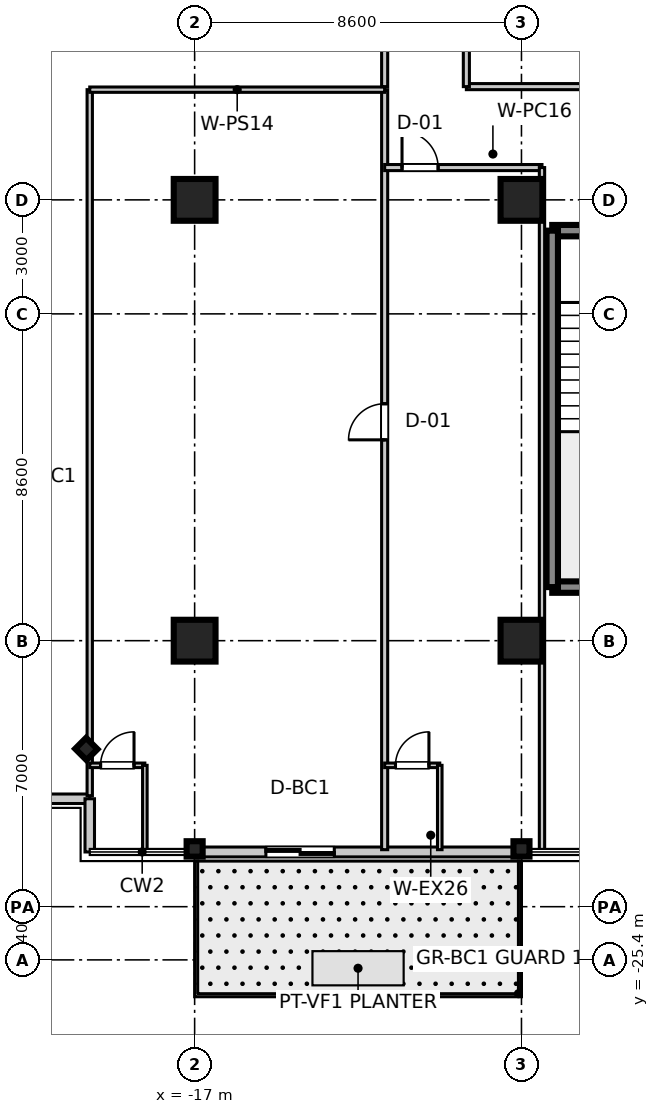
"""IFC4 building model, lengths in metres.
Left out: names, types, materials, properties, quantities, classifications, styles, units other than length and angle.
Written with IfcOpenShell. Run it as: python <this file> out.ifc"""

import sys

from ifc_helpers import new_model, si_unit, direction, frame, frame_2d, origin, origin_2d, place, context, subcontext, project, spatial, rectangle, i_section, extrude, source, transform, mapped, element, fill, save


model = new_model("IFC4")
c1 = context("Model", 3, precision=1e-05, world=origin(), true_north=direction((0.0, 1.0)))
c2 = subcontext(c1, "Body", "Model", "MODEL_VIEW")
j1 = project(units=[si_unit("LENGTHUNIT", "METRE"), si_unit("PLANEANGLEUNIT", "RADIAN")], contexts=[c1])
p1 = place(None, origin())
s1 = spatial("IfcSite", under=j1, at=p1, CompositionType="ELEMENT")
p2 = place(p1, origin())
s2 = spatial("IfcBuilding", under=s1, at=p2, CompositionType="ELEMENT")
p3 = place(p2, frame((0.0, 0.0, 156.3)))
s3 = spatial("IfcBuildingStorey", under=s2, at=p3, CompositionType="ELEMENT", Elevation=156.3)
m1 = source(origin(), c2, "Body", "SweptSolid", [
    extrude(rectangle(XDim=1.1, YDim=1.1, at=origin_2d()), origin(), (0.0, 0.0, 1.0), 3.605),
])
for number, where, z_axis, x_axis in (
    (1, (-17.0, -17.0, 0.0), (0.0, 0.0, 1.0), (1.0, 0.0, 0.0)),
    (2, (-17.0, -5.4, 0.0), (0.0, 0.0, 1.0), (1.0, 0.0, 0.0)),
    (3, (-8.4, -17.0, 0.0), (0.0, 0.0, 1.0), (1.0, 0.0, 0.0)),
    (4, (-8.4, -5.4, 0.0), (0.0, 0.0, 1.0), (1.0, 0.0, 0.0)),
):
    element("IfcColumn", number, at=place(p3, frame(where, z_axis=z_axis, x_axis=x_axis)), inside=s3, PredefinedType="COLUMN", context=c2, shape_type="MappedRepresentation", body=[
        mapped(m1, transform((0.0, 0.0, 0.0), scale=1.0)),
    ])
m2 = source(origin(), c2, "Body", "SweptSolid", [
    extrude(i_section(OverallWidth=0.406, OverallDepth=0.422, WebThickness=0.019, FlangeThickness=0.03, at=origin_2d()), origin(), (0.0, 0.0, 1.0), 3.605),
])
for number, where, z_axis, x_axis in (
    (5, (-17.0, -22.48, 0.0), (0.0, 0.0, 1.0), (0.0, 1.0, 0.0)),
    (6, (-8.4, -22.48, 0.0), (0.0, 0.0, 1.0), (0.0, 1.0, 0.0)),
    (7, (-19.85, -19.85, 0.0), (0.0, 0.0, 1.0), (0.707, 0.707, 0.0)),
):
    element("IfcColumn", number, at=place(p3, frame(where, z_axis=z_axis, x_axis=x_axis)), inside=s3, PredefinedType="COLUMN", context=c2, shape_type="MappedRepresentation", body=[
        mapped(m2, transform((0.0, 0.0, 0.0), scale=1.0)),
    ])
m3 = source(origin(), c2, "Body", "SweptSolid", [
    extrude(rectangle(XDim=3.98, YDim=0.3, at=frame_2d((1.99, 0.0))), origin(), (0.0, 0.0, 1.0), 3.39),
])
p4 = place(p3, frame((-7.59, -15.59, 0.0), z_axis=(0.0, 0.0, 1.0), x_axis=(1.0, 0.0, 0.0)))
e8 = element("IfcWall", 8, at=p4, inside=s3, PredefinedType="SHEAR", context=c2, shape_type="MappedRepresentation", body=[
    mapped(m3, transform((0.0, 0.0, 0.0), scale=1.0)),
])
p5 = place(p3, frame((-7.59, -6.21, 0.0), z_axis=(0.0, 0.0, 1.0), x_axis=(1.0, 0.0, 0.0)))
e9 = element("IfcWall", 9, at=p5, inside=s3, PredefinedType="SHEAR", context=c2, shape_type="MappedRepresentation", body=[
    mapped(m3, transform((0.0, 0.0, 0.0), scale=1.0)),
])
p6 = place(p5, frame((1.44, 0.0, 0.0)))
e10 = element("IfcOpeningElement", 10, at=p6, cuts=e9, PredefinedType="OPENING", context=c2, shape_type="SweptSolid", body=[
    extrude(rectangle(XDim=1.1, YDim=2.15, at=frame_2d((0.55, 1.075))), frame((0.0, 0.16, 0.0), z_axis=(0.0, -1.0, 0.0), x_axis=(1.0, 0.0, 0.0)), (0.0, 0.0, 1.0), 0.32),
])
m4 = source(origin(), c2, "Body", "SweptSolid", [
    extrude(rectangle(XDim=9.38, YDim=0.3, at=frame_2d((4.69, 0.0))), origin(), (0.0, 0.0, 1.0), 3.39),
])
p7 = place(p3, frame((-7.59, -15.59, 0.0), z_axis=(0.0, 0.0, 1.0), x_axis=(0.0, 1.0, 0.0)))
e11 = element("IfcWall", 11, at=p7, inside=s3, PredefinedType="SHEAR", context=c2, shape_type="MappedRepresentation", body=[
    mapped(m4, transform((0.0, 0.0, 0.0), scale=1.0)),
])
m5 = source(origin(), c2, "Body", "SweptSolid", [
    extrude(rectangle(XDim=1.4, YDim=0.25, at=frame_2d((0.7, 0.0))), origin(), (0.0, 0.0, 1.0), 3.39),
])
p8 = place(p3, frame((-21.16, -21.16, 0.0), z_axis=(0.0, 0.0, 1.0), x_axis=(1.0, 0.0, 0.0)))
e12 = element("IfcWall", 12, at=p8, inside=s3, PredefinedType="STANDARD", context=c2, shape_type="MappedRepresentation", body=[
    mapped(m5, transform((0.0, 0.0, 0.0), scale=1.0)),
])
m6 = source(origin(), c2, "Body", "SweptSolid", [
    extrude(rectangle(XDim=1.4, YDim=0.25, at=frame_2d((0.7, 0.0))), origin(), (0.0, 0.0, 1.0), 3.39),
])
p9 = place(p3, frame((-19.76, -22.56, 0.0), z_axis=(0.0, 0.0, 1.0), x_axis=(0.0, 1.0, 0.0)))
e13 = element("IfcWall", 13, at=p9, inside=s3, PredefinedType="STANDARD", context=c2, shape_type="MappedRepresentation", body=[
    mapped(m6, transform((0.0, 0.0, 0.0), scale=1.0)),
])
m7 = source(origin(), c2, "Body", "SweptSolid", [
    extrude(rectangle(XDim=8.6, YDim=0.26, at=frame_2d((4.3, 0.0))), origin(), (0.0, 0.0, 1.0), 2.87),
])
p10 = place(p3, frame((-17.0, -22.56, 0.0), z_axis=(0.0, 0.0, 1.0), x_axis=(1.0, 0.0, 0.0)))
e14 = element("IfcWall", 14, at=p10, inside=s3, PredefinedType="STANDARD", context=c2, shape_type="MappedRepresentation", body=[
    mapped(m7, transform((0.0, 0.0, 0.0), scale=1.0)),
])
p11 = place(p10, frame((1.875, 0.0, 0.0)))
e15 = element("IfcOpeningElement", 15, at=p11, cuts=e14, PredefinedType="OPENING", context=c2, shape_type="SweptSolid", body=[
    extrude(rectangle(XDim=1.8, YDim=2.25, at=frame_2d((0.9, 1.125))), frame((0.0, 0.14, 0.0), z_axis=(0.0, -1.0, 0.0), x_axis=(1.0, 0.0, 0.0)), (0.0, 0.0, 1.0), 0.28),
])
m8 = source(origin(), c2, "Body", "SweptSolid", [
    extrude(rectangle(XDim=20.0, YDim=0.16, at=frame_2d((10.0, 0.0))), origin(), (0.0, 0.0, 1.0), 2.73),
])
p12 = place(p3, frame((-12.0, -22.5, 0.0), z_axis=(0.0, 0.0, 1.0), x_axis=(0.0, 1.0, 0.0)))
e16 = element("IfcWall", 16, at=p12, inside=s3, PredefinedType="PARTITIONING", context=c2, shape_type="MappedRepresentation", body=[
    mapped(m8, transform((0.0, 0.0, 0.0), scale=1.0)),
])
p13 = place(p12, frame((10.785, 0.0, 0.0)))
e17 = element("IfcOpeningElement", 17, at=p13, cuts=e16, PredefinedType="OPENING", context=c2, shape_type="SweptSolid", body=[
    extrude(rectangle(XDim=0.95, YDim=2.1, at=frame_2d((0.475, 1.05))), frame((0.0, 0.09, 0.0), z_axis=(0.0, -1.0, 0.0), x_axis=(1.0, 0.0, 0.0)), (0.0, 0.0, 1.0), 0.18),
])
m9 = source(origin(), c2, "Body", "SweptSolid", [
    extrude(rectangle(XDim=18.58, YDim=0.14, at=frame_2d((9.29, 0.0))), origin(), (0.0, 0.0, 1.0), 2.73),
])
p14 = place(p3, frame((-19.76, -21.08, 0.0), z_axis=(0.0, 0.0, 1.0), x_axis=(0.0, 1.0, 0.0)))
e18 = element("IfcWall", 18, at=p14, inside=s3, PredefinedType="PARTITIONING", context=c2, shape_type="MappedRepresentation", body=[
    mapped(m9, transform((0.0, 0.0, 0.0), scale=1.0)),
])
m10 = source(origin(), c2, "Body", "SweptSolid", [
    extrude(rectangle(XDim=7.76, YDim=0.14, at=frame_2d((3.88, 0.0))), origin(), (0.0, 0.0, 1.0), 2.73),
])
p15 = place(p3, frame((-19.76, -2.5, 0.0), z_axis=(0.0, 0.0, 1.0), x_axis=(1.0, 0.0, 0.0)))
e19 = element("IfcWall", 19, at=p15, inside=s3, PredefinedType="PARTITIONING", context=c2, shape_type="MappedRepresentation", body=[
    mapped(m10, transform((0.0, 0.0, 0.0), scale=1.0)),
])
m11 = source(origin(), c2, "Body", "SweptSolid", [
    extrude(rectangle(XDim=1.45, YDim=0.12, at=frame_2d((0.725, 0.0))), origin(), (0.0, 0.0, 1.0), 2.73),
])
p16 = place(p3, frame((-19.76, -20.28, 0.0), z_axis=(0.0, 0.0, 1.0), x_axis=(1.0, 0.0, 0.0)))
e20 = element("IfcWall", 20, at=p16, inside=s3, PredefinedType="PARTITIONING", context=c2, shape_type="MappedRepresentation", body=[
    mapped(m11, transform((0.0, 0.0, 0.0), scale=1.0)),
])
p17 = place(p16, frame((0.285, 0.0, 0.0)))
e21 = element("IfcOpeningElement", 21, at=p17, cuts=e20, PredefinedType="OPENING", context=c2, shape_type="SweptSolid", body=[
    extrude(rectangle(XDim=0.88, YDim=2.1, at=frame_2d((0.44, 1.05))), frame((0.0, 0.07, 0.0), z_axis=(0.0, -1.0, 0.0), x_axis=(1.0, 0.0, 0.0)), (0.0, 0.0, 1.0), 0.14),
])
m12 = source(origin(), c2, "Body", "SweptSolid", [
    extrude(rectangle(XDim=2.22, YDim=0.12, at=frame_2d((1.11, 0.0))), origin(), (0.0, 0.0, 1.0), 2.73),
])
p18 = place(p3, frame((-18.31, -22.5, 0.0), z_axis=(0.0, 0.0, 1.0), x_axis=(0.0, 1.0, 0.0)))
e22 = element("IfcWall", 22, at=p18, inside=s3, PredefinedType="PARTITIONING", context=c2, shape_type="MappedRepresentation", body=[
    mapped(m12, transform((0.0, 0.0, 0.0), scale=1.0)),
])
m13 = source(origin(), c2, "Body", "SweptSolid", [
    extrude(rectangle(XDim=4.14, YDim=0.16, at=frame_2d((2.07, 0.0))), origin(), (0.0, 0.0, 1.0), 2.73),
])
p19 = place(p3, frame((-12.0, -4.55, 0.0), z_axis=(0.0, 0.0, 1.0), x_axis=(1.0, 0.0, 0.0)))
e23 = element("IfcWall", 23, at=p19, inside=s3, PredefinedType="PARTITIONING", context=c2, shape_type="MappedRepresentation", body=[
    mapped(m13, transform((0.0, 0.0, 0.0), scale=1.0)),
])
p20 = place(p19, frame((0.457, 0.0, 0.0)))
e24 = element("IfcOpeningElement", 24, at=p20, cuts=e23, PredefinedType="OPENING", context=c2, shape_type="SweptSolid", body=[
    extrude(rectangle(XDim=0.95, YDim=2.1, at=frame_2d((0.475, 1.05))), frame((0.0, 0.09, 0.0), z_axis=(0.0, -1.0, 0.0), x_axis=(1.0, 0.0, 0.0)), (0.0, 0.0, 1.0), 0.18),
])
m14 = source(origin(), c2, "Body", "SweptSolid", [
    extrude(rectangle(XDim=17.95, YDim=0.14, at=frame_2d((8.975, 0.0))), origin(), (0.0, 0.0, 1.0), 2.73),
])
p21 = place(p3, frame((-7.86, -22.5, 0.0), z_axis=(0.0, 0.0, 1.0), x_axis=(0.0, 1.0, 0.0)))
e25 = element("IfcWall", 25, at=p21, inside=s3, PredefinedType="PARTITIONING", context=c2, shape_type="MappedRepresentation", body=[
    mapped(m14, transform((0.0, 0.0, 0.0), scale=1.0)),
])
p22 = place(p3, frame((-12.0, -20.28, 0.0), z_axis=(0.0, 0.0, 1.0), x_axis=(1.0, 0.0, 0.0)))
e26 = element("IfcWall", 26, at=p22, inside=s3, PredefinedType="PARTITIONING", context=c2, shape_type="MappedRepresentation", body=[
    mapped(m11, transform((0.0, 0.0, 0.0), scale=1.0)),
])
p23 = place(p22, frame((0.285, 0.0, 0.0)))
e27 = element("IfcOpeningElement", 27, at=p23, cuts=e26, PredefinedType="OPENING", context=c2, shape_type="SweptSolid", body=[
    extrude(rectangle(XDim=0.88, YDim=2.1, at=frame_2d((0.44, 1.05))), frame((0.0, 0.07, 0.0), z_axis=(0.0, -1.0, 0.0), x_axis=(1.0, 0.0, 0.0)), (0.0, 0.0, 1.0), 0.14),
])
p24 = place(p3, frame((-10.55, -22.5, 0.0), z_axis=(0.0, 0.0, 1.0), x_axis=(0.0, 1.0, 0.0)))
e28 = element("IfcWall", 28, at=p24, inside=s3, PredefinedType="PARTITIONING", context=c2, shape_type="MappedRepresentation", body=[
    mapped(m12, transform((0.0, 0.0, 0.0), scale=1.0)),
])
m15 = source(origin(), c2, "Body", "SweptSolid", [
    extrude(rectangle(XDim=4.84, YDim=0.16, at=frame_2d((2.42, 0.0))), origin(), (0.0, 0.0, 1.0), 2.73),
])
p25 = place(p3, frame((-12.0, -2.42, 0.0), z_axis=(0.0, 0.0, 1.0), x_axis=(0.0, 1.0, 0.0)))
e29 = element("IfcWall", 29, at=p25, inside=s3, PredefinedType="PARTITIONING", context=c2, shape_type="MappedRepresentation", body=[
    mapped(m15, transform((0.0, 0.0, 0.0), scale=1.0)),
])
p26 = place(p25, frame((1.945, 0.0, 0.0)))
e30 = element("IfcOpeningElement", 30, at=p26, cuts=e29, PredefinedType="OPENING", context=c2, shape_type="SweptSolid", body=[
    extrude(rectangle(XDim=0.95, YDim=2.1, at=frame_2d((0.475, 1.05))), frame((0.0, 0.09, 0.0), z_axis=(0.0, -1.0, 0.0), x_axis=(1.0, 0.0, 0.0)), (0.0, 0.0, 1.0), 0.18),
])
m16 = source(origin(), c2, "Body", "SweptSolid", [
    extrude(rectangle(XDim=5.676, YDim=0.16, at=frame_2d((2.838, 0.0))), origin(), (0.0, 0.0, 1.0), 2.73),
])
p27 = place(p3, frame((-9.85, -2.42, 0.0), z_axis=(0.0, 0.0, 1.0), x_axis=(1.0, 0.0, 0.0)))
e31 = element("IfcWall", 31, at=p27, inside=s3, PredefinedType="PARTITIONING", context=c2, shape_type="MappedRepresentation", body=[
    mapped(m16, transform((0.0, 0.0, 0.0), scale=1.0)),
])
p28 = place(p3, frame((-9.85, -2.42, 0.0), z_axis=(0.0, 0.0, 1.0), x_axis=(0.0, 1.0, 0.0)))
e32 = element("IfcWall", 32, at=p28, inside=s3, PredefinedType="PARTITIONING", context=c2, shape_type="MappedRepresentation", body=[
    mapped(m15, transform((0.0, 0.0, 0.0), scale=1.0)),
])
m17 = source(origin(), c2, "Body", "SweptSolid", [
    extrude(rectangle(XDim=0.88, YDim=2.1, at=frame_2d((0.44, 1.05))), frame((0.0, 0.025, 0.0), z_axis=(0.0, -1.0, 0.0), x_axis=(1.0, 0.0, 0.0)), (0.0, 0.0, 1.0), 0.05),
])
p29 = place(p17, frame((0.88, 0.0, 0.0), z_axis=(0.0, 0.0, 1.0), x_axis=(-1.0, 0.0, 0.0)))
e33 = element("IfcDoor", 33, at=p29, inside=s3, OperationType="SINGLE_SWING_RIGHT", PredefinedType="DOOR", context=c2, shape_type="MappedRepresentation", body=[
    mapped(m17, transform((0.0, 0.0, 0.0), scale=1.0)),
])
fill(e21, e33)
m18 = source(origin(), c2, "Body", "SweptSolid", [
    extrude(rectangle(XDim=0.95, YDim=2.1, at=frame_2d((0.475, 1.05))), frame((0.0, 0.025, 0.0), z_axis=(0.0, -1.0, 0.0), x_axis=(1.0, 0.0, 0.0)), (0.0, 0.0, 1.0), 0.05),
])
p30 = place(p13, origin())
e34 = element("IfcDoor", 34, at=p30, inside=s3, OperationType="SINGLE_SWING_LEFT", PredefinedType="DOOR", context=c2, shape_type="MappedRepresentation", body=[
    mapped(m18, transform((0.0, 0.0, 0.0), scale=1.0)),
])
fill(e17, e34)
p31 = place(p23, frame((0.88, 0.0, 0.0), z_axis=(0.0, 0.0, 1.0), x_axis=(-1.0, 0.0, 0.0)))
e35 = element("IfcDoor", 35, at=p31, inside=s3, OperationType="SINGLE_SWING_RIGHT", PredefinedType="DOOR", context=c2, shape_type="MappedRepresentation", body=[
    mapped(m17, transform((0.0, 0.0, 0.0), scale=1.0)),
])
fill(e27, e35)
p32 = place(p20, frame((0.95, 0.0, 0.0), z_axis=(0.0, 0.0, 1.0), x_axis=(-1.0, 0.0, 0.0)))
e36 = element("IfcDoor", 36, at=p32, inside=s3, OperationType="SINGLE_SWING_LEFT", PredefinedType="DOOR", context=c2, shape_type="MappedRepresentation", body=[
    mapped(m18, transform((0.0, 0.0, 0.0), scale=1.0)),
])
fill(e24, e36)
m19 = source(origin(), c2, "Body", "SweptSolid", [
    extrude(rectangle(XDim=1.8, YDim=2.25, at=frame_2d((0.9, 1.125))), frame((0.0, 0.025, 0.0), z_axis=(0.0, -1.0, 0.0), x_axis=(1.0, 0.0, 0.0)), (0.0, 0.0, 1.0), 0.05),
])
p33 = place(p11, frame((1.8, 0.0, 0.0), z_axis=(0.0, 0.0, 1.0), x_axis=(-1.0, 0.0, 0.0)))
e37 = element("IfcDoor", 37, at=p33, inside=s3, OperationType="DOUBLE_DOOR_SLIDING", PredefinedType="DOOR", context=c2, shape_type="MappedRepresentation", body=[
    mapped(m19, transform((0.0, 0.0, 0.0), scale=1.0)),
])
fill(e15, e37)
save(model, sys.argv[1])
